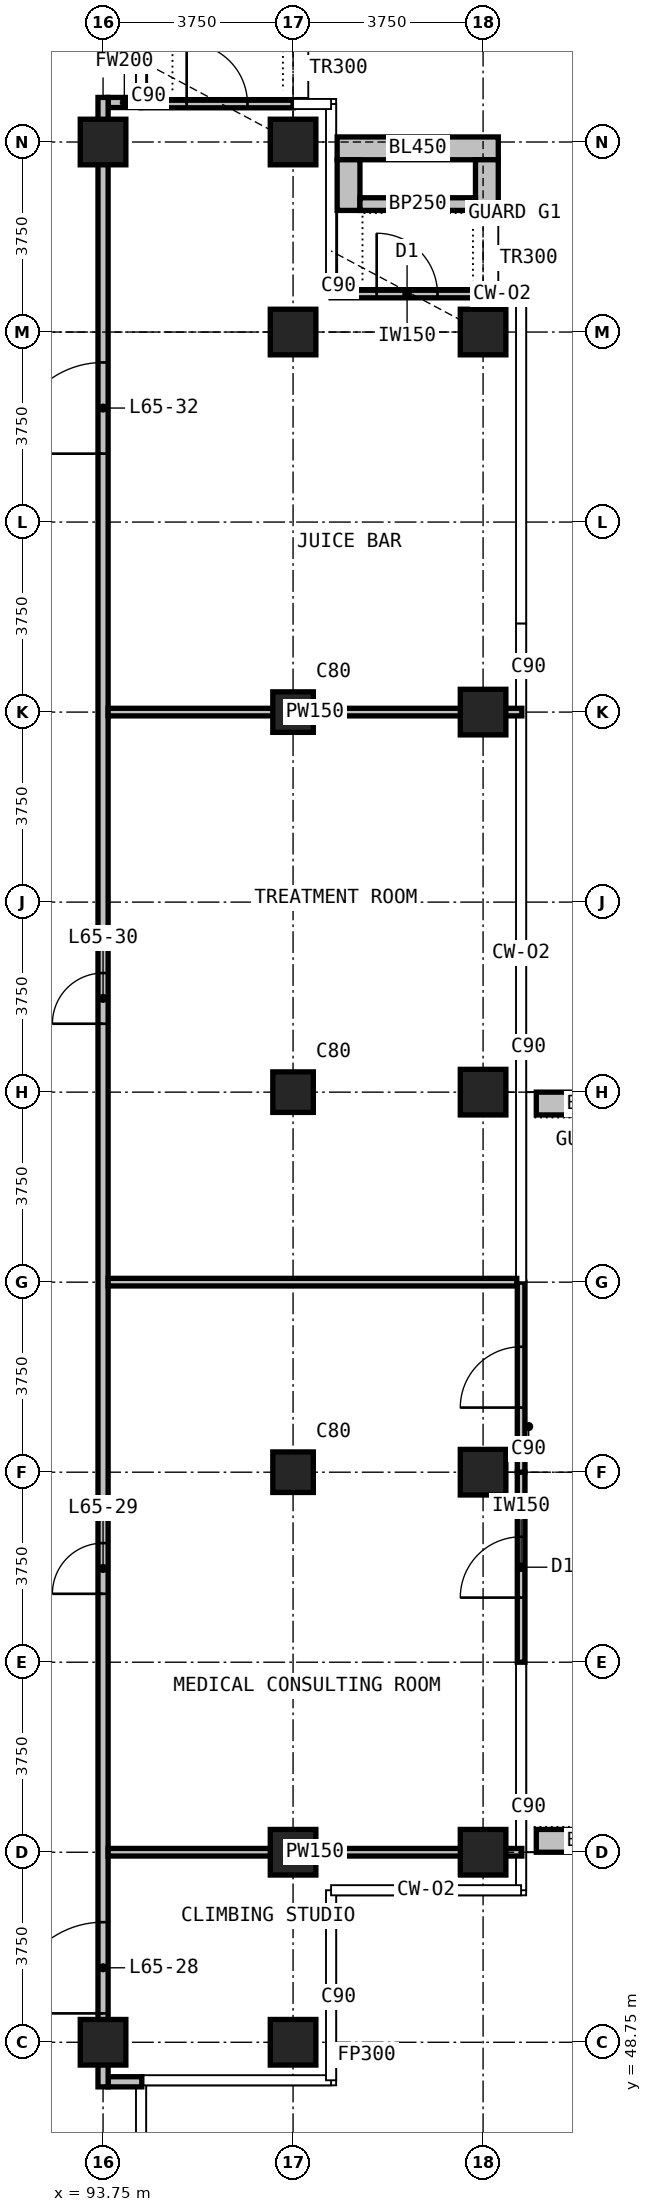
"""IFC4 building model, lengths in metres.
Left out: names, types, materials, properties, quantities, classifications, styles, units other than length and angle.
Written with IfcOpenShell. Run it as: python <this file> out.ifc"""

import sys

from ifc_helpers import new_model, si_unit, direction, frame, frame_2d, origin, origin_2d, place, context, subcontext, project, spatial, rectangle, extrude, element, fill, save


model = new_model("IFC4")
c1 = context("Model", 3, precision=1e-05, world=origin(), true_north=direction((0.0, 1.0)))
c2 = subcontext(c1, "Body", "Model", "MODEL_VIEW")
j1 = project(units=[si_unit("LENGTHUNIT", "METRE"), si_unit("PLANEANGLEUNIT", "RADIAN")], contexts=[c1])
p1 = place(None, origin())
s1 = spatial("IfcSite", under=j1, at=p1, CompositionType="ELEMENT")
p2 = place(p1, origin())
s2 = spatial("IfcBuilding", under=s1, at=p2, CompositionType="ELEMENT")
p3 = place(p2, frame((0.0, 0.0, 249.9)))
s3 = spatial("IfcBuildingStorey", under=s2, at=p3, CompositionType="ELEMENT", Elevation=249.9)
for number, where, z_axis, x_axis in (
    (1, (93.75, 48.75, 0.0), (0.0, 0.0, 1.0), (1.0, 0.0, 0.0)),
    (2, (93.75, 86.25, 0.0), (0.0, 0.0, 1.0), (1.0, 0.0, 0.0)),
    (3, (97.5, 48.75, 0.0), (0.0, 0.0, 1.0), (1.0, 0.0, 0.0)),
    (4, (97.5, 52.5, 0.0), (0.0, 0.0, 1.0), (1.0, 0.0, 0.0)),
):
    element("IfcColumn", number, at=place(p3, frame(where, z_axis=z_axis, x_axis=x_axis)), inside=s3, PredefinedType="COLUMN", context=c2, shape_type="SweptSolid", body=[
        extrude(rectangle(XDim=0.9, YDim=0.9, at=origin_2d()), origin(), (0.0, 0.0, 1.0), 3.6),
    ])
for number, where, z_axis, x_axis in (
    (5, (97.5, 60.0, 0.0), (0.0, 0.0, 1.0), (1.0, 0.0, 0.0)),
    (6, (97.5, 67.5, 0.0), (0.0, 0.0, 1.0), (1.0, 0.0, 0.0)),
    (7, (97.5, 75.0, 0.0), (0.0, 0.0, 1.0), (1.0, 0.0, 0.0)),
):
    element("IfcColumn", number, at=place(p3, frame(where, z_axis=z_axis, x_axis=x_axis)), inside=s3, PredefinedType="COLUMN", context=c2, shape_type="SweptSolid", body=[
        extrude(rectangle(XDim=0.8, YDim=0.8, at=origin_2d()), origin(), (0.0, 0.0, 1.0), 3.6),
    ])
for number, where, z_axis, x_axis in (
    (8, (97.5, 82.5, 0.0), (0.0, 0.0, 1.0), (1.0, 0.0, 0.0)),
    (9, (97.5, 86.25, 0.0), (0.0, 0.0, 1.0), (1.0, 0.0, 0.0)),
    (10, (101.25, 52.5, 0.0), (0.0, 0.0, 1.0), (1.0, 0.0, 0.0)),
    (11, (101.25, 60.0, 0.0), (0.0, 0.0, 1.0), (1.0, 0.0, 0.0)),
    (12, (101.25, 67.5, 0.0), (0.0, 0.0, 1.0), (1.0, 0.0, 0.0)),
    (13, (101.25, 75.0, 0.0), (0.0, 0.0, 1.0), (1.0, 0.0, 0.0)),
    (14, (101.25, 82.5, 0.0), (0.0, 0.0, 1.0), (1.0, 0.0, 0.0)),
):
    element("IfcColumn", number, at=place(p3, frame(where, z_axis=z_axis, x_axis=x_axis)), inside=s3, PredefinedType="COLUMN", context=c2, shape_type="SweptSolid", body=[
        extrude(rectangle(XDim=0.9, YDim=0.9, at=origin_2d()), origin(), (0.0, 0.0, 1.0), 3.6),
    ])
p4 = place(p3, frame((102.0, 56.25, 0.0), z_axis=(0.0, 0.0, 1.0), x_axis=(0.0, 1.0, 0.0)))
e15 = element("IfcWall", 15, at=p4, inside=s3, PredefinedType="SOLIDWALL", context=c2, shape_type="SweptSolid", body=[
    extrude(rectangle(XDim=3.75, YDim=0.15, at=frame_2d((1.875, 0.0))), origin(), (0.0, 0.0, 1.0), 3.25),
])
p5 = place(p4, frame((1.275, 0.0, 0.0)))
e16 = element("IfcOpeningElement", 16, at=p5, cuts=e15, PredefinedType="OPENING", context=c2, shape_type="SweptSolid", body=[
    extrude(rectangle(XDim=1.2, YDim=2.4, at=frame_2d((0.6, 1.2))), frame((0.0, 0.085, 0.0), z_axis=(0.0, -1.0, 0.0), x_axis=(1.0, 0.0, 0.0)), (0.0, 0.0, 1.0), 0.17),
])
p6 = place(p3, frame((102.0, 60.0, 0.0), z_axis=(0.0, 0.0, 1.0), x_axis=(0.0, 1.0, 0.0)))
e17 = element("IfcWall", 17, at=p6, inside=s3, PredefinedType="SOLIDWALL", context=c2, shape_type="SweptSolid", body=[
    extrude(rectangle(XDim=3.75, YDim=0.15, at=frame_2d((1.875, 0.0))), origin(), (0.0, 0.0, 1.0), 3.25),
])
p7 = place(p6, frame((1.275, 0.0, 0.0)))
e18 = element("IfcOpeningElement", 18, at=p7, cuts=e17, PredefinedType="OPENING", context=c2, shape_type="SweptSolid", body=[
    extrude(rectangle(XDim=1.2, YDim=2.4, at=frame_2d((0.6, 1.2))), frame((0.0, 0.085, 0.0), z_axis=(0.0, -1.0, 0.0), x_axis=(1.0, 0.0, 0.0)), (0.0, 0.0, 1.0), 0.17),
])
p8 = place(p3, frame((98.25, 83.25, 0.0), z_axis=(0.0, 0.0, 1.0), x_axis=(1.0, 0.0, 0.0)))
e19 = element("IfcWall", 19, at=p8, inside=s3, PredefinedType="SOLIDWALL", context=c2, shape_type="SweptSolid", body=[
    extrude(rectangle(XDim=3.0, YDim=0.15, at=frame_2d((1.5, 0.0))), origin(), (0.0, 0.0, 1.0), 3.25),
])
p9 = place(p8, frame((0.9, 0.0, 0.0)))
e20 = element("IfcOpeningElement", 20, at=p9, cuts=e19, PredefinedType="OPENING", context=c2, shape_type="SweptSolid", body=[
    extrude(rectangle(XDim=1.2, YDim=2.4, at=frame_2d((0.6, 1.2))), frame((0.0, 0.085, 0.0), z_axis=(0.0, -1.0, 0.0), x_axis=(1.0, 0.0, 0.0)), (0.0, 0.0, 1.0), 0.17),
])
p10 = place(p3, frame((94.5, 87.0, 0.0), z_axis=(0.0, 0.0, 1.0), x_axis=(1.0, 0.0, 0.0)))
e21 = element("IfcWall", 21, at=p10, inside=s3, PredefinedType="SOLIDWALL", context=c2, shape_type="SweptSolid", body=[
    extrude(rectangle(XDim=3.0, YDim=0.15, at=frame_2d((1.5, 0.0))), origin(), (0.0, 0.0, 1.0), 3.25),
])
p11 = place(p10, frame((0.9, 0.0, 0.0)))
e22 = element("IfcOpeningElement", 22, at=p11, cuts=e21, PredefinedType="OPENING", context=c2, shape_type="SweptSolid", body=[
    extrude(rectangle(XDim=1.2, YDim=2.4, at=frame_2d((0.6, 1.2))), frame((0.0, 0.085, 0.0), z_axis=(0.0, -1.0, 0.0), x_axis=(1.0, 0.0, 0.0)), (0.0, 0.0, 1.0), 0.17),
])
for number, where, z_axis, x_axis in (
    (23, (102.3, 52.725, 0.0), (0.0, 0.0, 1.0), (1.0, 0.0, 0.0)),
    (24, (102.3, 67.275, 0.0), (0.0, 0.0, 1.0), (1.0, 0.0, 0.0)),
):
    element("IfcWall", number, at=place(p3, frame(where, z_axis=z_axis, x_axis=x_axis)), inside=s3, PredefinedType="USERDEFINED", context=c2, shape_type="SweptSolid", body=[
        extrude(rectangle(XDim=2.35, YDim=0.45, at=frame_2d((1.175, 0.0))), origin(), (0.0, 0.0, 1.0), 1.1),
    ])
p12 = place(p3, frame((98.37, 86.125, 0.0), z_axis=(0.0, 0.0, 1.0), x_axis=(1.0, 0.0, 0.0)))
e25 = element("IfcWall", 25, at=p12, inside=s3, PredefinedType="USERDEFINED", context=c2, shape_type="SweptSolid", body=[
    extrude(rectangle(XDim=3.18, YDim=0.45, at=frame_2d((1.59, 0.0))), origin(), (0.0, 0.0, 1.0), 1.1),
])
for number, where, z_axis, x_axis in (
    (26, (98.595, 84.9, 0.0), (0.0, 0.0, 1.0), (0.0, 1.0, 0.0)),
    (27, (101.325, 84.9, 0.0), (0.0, 0.0, 1.0), (0.0, 1.0, 0.0)),
):
    element("IfcWall", number, at=place(p3, frame(where, z_axis=z_axis, x_axis=x_axis)), inside=s3, PredefinedType="USERDEFINED", context=c2, shape_type="SweptSolid", body=[
        extrude(rectangle(XDim=1.0, YDim=0.45, at=frame_2d((0.5, 0.0))), origin(), (0.0, 0.0, 1.0), 1.1),
    ])
p13 = place(p3, frame((98.82, 85.025, 0.0), z_axis=(0.0, 0.0, 1.0), x_axis=(1.0, 0.0, 0.0)))
e28 = element("IfcWall", 28, at=p13, inside=s3, PredefinedType="USERDEFINED", context=c2, shape_type="SweptSolid", body=[
    extrude(rectangle(XDim=2.28, YDim=0.25, at=frame_2d((1.14, 0.0))), origin(), (0.0, 0.0, 1.0), 1.0),
])
p14 = place(p3, frame((93.85, 47.97, 0.0), z_axis=(0.0, 0.0, 1.0), x_axis=(1.0, 0.0, 0.0)))
e29 = element("IfcWall", 29, at=p14, inside=s3, PredefinedType="PARTITIONING", context=c2, shape_type="SweptSolid", body=[
    extrude(rectangle(XDim=0.665, YDim=0.2, at=frame_2d((0.333, 0.0))), origin(), (0.0, 0.0, 1.0), 3.25),
])
p15 = place(p3, frame((93.85, 87.03, 0.0), z_axis=(0.0, 0.0, 1.0), x_axis=(1.0, 0.0, 0.0)))
e30 = element("IfcWall", 30, at=p15, inside=s3, PredefinedType="PARTITIONING", context=c2, shape_type="SweptSolid", body=[
    extrude(rectangle(XDim=0.64, YDim=0.2, at=frame_2d((0.32, 0.0))), origin(), (0.0, 0.0, 1.0), 3.25),
])
p16 = place(p3, frame((93.75, 47.87, 0.0), z_axis=(0.0, 0.0, 1.0), x_axis=(0.0, 1.0, 0.0)))
e31 = element("IfcWall", 31, at=p16, inside=s3, PredefinedType="PARTITIONING", context=c2, shape_type="SweptSolid", body=[
    extrude(rectangle(XDim=39.26, YDim=0.2, at=frame_2d((19.63, 0.0))), origin(), (0.0, 0.0, 1.0), 3.25),
])
p17 = place(p16, frame((1.45, 0.0, 0.0)))
e32 = element("IfcOpeningElement", 32, at=p17, cuts=e31, PredefinedType="OPENING", context=c2, shape_type="SweptSolid", body=[
    extrude(rectangle(XDim=1.8, YDim=2.2, at=frame_2d((0.9, 1.1))), frame((0.0, 0.11, 0.0), z_axis=(0.0, -1.0, 0.0), x_axis=(1.0, 0.0, 0.0)), (0.0, 0.0, 1.0), 0.22),
])
p18 = place(p16, frame((9.73, 0.0, 0.0)))
e33 = element("IfcOpeningElement", 33, at=p18, cuts=e31, PredefinedType="OPENING", context=c2, shape_type="SweptSolid", body=[
    extrude(rectangle(XDim=1.0, YDim=2.2, at=frame_2d((0.5, 1.1))), frame((0.0, 0.11, 0.0), z_axis=(0.0, -1.0, 0.0), x_axis=(1.0, 0.0, 0.0)), (0.0, 0.0, 1.0), 0.22),
])
p19 = place(p16, frame((20.98, 0.0, 0.0)))
e34 = element("IfcOpeningElement", 34, at=p19, cuts=e31, PredefinedType="OPENING", context=c2, shape_type="SweptSolid", body=[
    extrude(rectangle(XDim=1.0, YDim=2.2, at=frame_2d((0.5, 1.1))), frame((0.0, 0.11, 0.0), z_axis=(0.0, -1.0, 0.0), x_axis=(1.0, 0.0, 0.0)), (0.0, 0.0, 1.0), 0.22),
])
p20 = place(p16, frame((32.23, 0.0, 0.0)))
e35 = element("IfcOpeningElement", 35, at=p20, cuts=e31, PredefinedType="OPENING", context=c2, shape_type="SweptSolid", body=[
    extrude(rectangle(XDim=1.8, YDim=2.2, at=frame_2d((0.9, 1.1))), frame((0.0, 0.11, 0.0), z_axis=(0.0, -1.0, 0.0), x_axis=(1.0, 0.0, 0.0)), (0.0, 0.0, 1.0), 0.22),
])
p21 = place(p3, frame((93.85, 52.5, 0.0), z_axis=(0.0, 0.0, 1.0), x_axis=(1.0, 0.0, 0.0)))
e36 = element("IfcWall", 36, at=p21, inside=s3, PredefinedType="PARTITIONING", context=c2, shape_type="SweptSolid", body=[
    extrude(rectangle(XDim=8.165, YDim=0.15, at=frame_2d((4.083, 0.0))), origin(), (0.0, 0.0, 1.0), 3.25),
])
p22 = place(p3, frame((93.85, 63.75, 0.0), z_axis=(0.0, 0.0, 1.0), x_axis=(1.0, 0.0, 0.0)))
e37 = element("IfcWall", 37, at=p22, inside=s3, PredefinedType="PARTITIONING", context=c2, shape_type="SweptSolid", body=[
    extrude(rectangle(XDim=8.065, YDim=0.15, at=frame_2d((4.032, 0.0))), origin(), (0.0, 0.0, 1.0), 3.25),
])
p23 = place(p3, frame((93.85, 75.0, 0.0), z_axis=(0.0, 0.0, 1.0), x_axis=(1.0, 0.0, 0.0)))
e38 = element("IfcWall", 38, at=p23, inside=s3, PredefinedType="PARTITIONING", context=c2, shape_type="SweptSolid", body=[
    extrude(rectangle(XDim=8.165, YDim=0.15, at=frame_2d((4.083, 0.0))), origin(), (0.0, 0.0, 1.0), 3.25),
])
p24 = place(p5, origin())
e39 = element("IfcDoor", 39, at=p24, inside=s3, OperationType="SINGLE_SWING_LEFT", PredefinedType="DOOR", context=c2, shape_type="SweptSolid", body=[
    extrude(rectangle(XDim=1.2, YDim=2.4, at=frame_2d((0.6, 1.2))), frame((0.0, 0.025, 0.0), z_axis=(0.0, -1.0, 0.0), x_axis=(1.0, 0.0, 0.0)), (0.0, 0.0, 1.0), 0.05),
])
fill(e16, e39)
p25 = place(p7, origin())
e40 = element("IfcDoor", 40, at=p25, inside=s3, OperationType="SINGLE_SWING_LEFT", PredefinedType="DOOR", context=c2, shape_type="SweptSolid", body=[
    extrude(rectangle(XDim=1.2, YDim=2.4, at=frame_2d((0.6, 1.2))), frame((0.0, 0.025, 0.0), z_axis=(0.0, -1.0, 0.0), x_axis=(1.0, 0.0, 0.0)), (0.0, 0.0, 1.0), 0.05),
])
fill(e18, e40)
p26 = place(p9, origin())
e41 = element("IfcDoor", 41, at=p26, inside=s3, OperationType="SINGLE_SWING_LEFT", PredefinedType="DOOR", context=c2, shape_type="SweptSolid", body=[
    extrude(rectangle(XDim=1.2, YDim=2.4, at=frame_2d((0.6, 1.2))), frame((0.0, 0.025, 0.0), z_axis=(0.0, -1.0, 0.0), x_axis=(1.0, 0.0, 0.0)), (0.0, 0.0, 1.0), 0.05),
])
fill(e20, e41)
p27 = place(p11, origin())
e42 = element("IfcDoor", 42, at=p27, inside=s3, OperationType="SINGLE_SWING_LEFT", PredefinedType="DOOR", context=c2, shape_type="SweptSolid", body=[
    extrude(rectangle(XDim=1.2, YDim=2.4, at=frame_2d((0.6, 1.2))), frame((0.0, 0.025, 0.0), z_axis=(0.0, -1.0, 0.0), x_axis=(1.0, 0.0, 0.0)), (0.0, 0.0, 1.0), 0.05),
])
fill(e22, e42)
p28 = place(p17, origin())
e43 = element("IfcDoor", 43, at=p28, inside=s3, OperationType="DOUBLE_DOOR_SINGLE_SWING", PredefinedType="DOOR", context=c2, shape_type="SweptSolid", body=[
    extrude(rectangle(XDim=1.8, YDim=2.2, at=frame_2d((0.9, 1.1))), frame((0.0, 0.025, 0.0), z_axis=(0.0, -1.0, 0.0), x_axis=(1.0, 0.0, 0.0)), (0.0, 0.0, 1.0), 0.05),
])
fill(e32, e43)
p29 = place(p18, origin())
e44 = element("IfcDoor", 44, at=p29, inside=s3, OperationType="SINGLE_SWING_LEFT", PredefinedType="DOOR", context=c2, shape_type="SweptSolid", body=[
    extrude(rectangle(XDim=1.0, YDim=2.2, at=frame_2d((0.5, 1.1))), frame((0.0, 0.025, 0.0), z_axis=(0.0, -1.0, 0.0), x_axis=(1.0, 0.0, 0.0)), (0.0, 0.0, 1.0), 0.05),
])
fill(e33, e44)
p30 = place(p19, origin())
e45 = element("IfcDoor", 45, at=p30, inside=s3, OperationType="SINGLE_SWING_RIGHT", PredefinedType="DOOR", context=c2, shape_type="SweptSolid", body=[
    extrude(rectangle(XDim=1.0, YDim=2.2, at=frame_2d((0.5, 1.1))), frame((0.0, 0.025, 0.0), z_axis=(0.0, -1.0, 0.0), x_axis=(1.0, 0.0, 0.0)), (0.0, 0.0, 1.0), 0.05),
])
fill(e34, e45)
p31 = place(p20, origin())
e46 = element("IfcDoor", 46, at=p31, inside=s3, OperationType="DOUBLE_DOOR_SINGLE_SWING", PredefinedType="DOOR", context=c2, shape_type="SweptSolid", body=[
    extrude(rectangle(XDim=1.8, YDim=2.2, at=frame_2d((0.9, 1.1))), frame((0.0, 0.025, 0.0), z_axis=(0.0, -1.0, 0.0), x_axis=(1.0, 0.0, 0.0)), (0.0, 0.0, 1.0), 0.05),
])
fill(e35, e46)
save(model, sys.argv[1])
